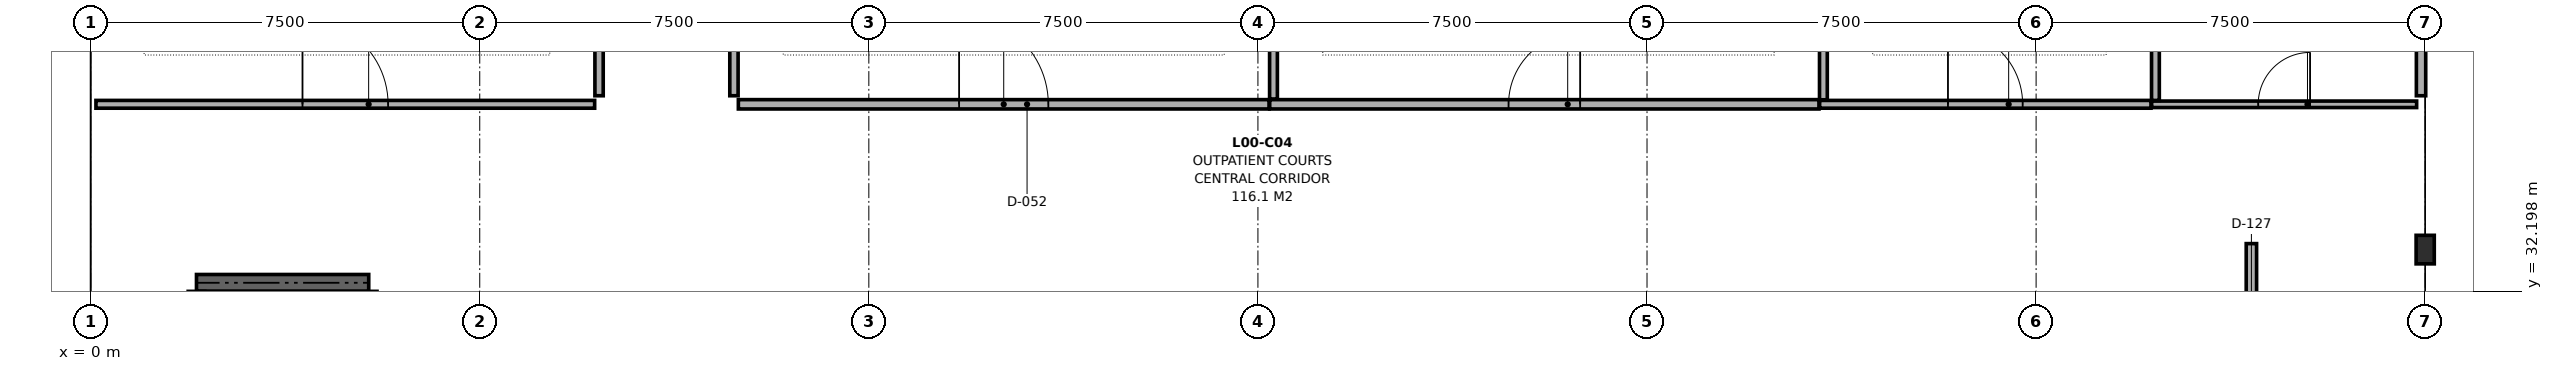
"""IFC4 building model, lengths in metres.
Left out: names, types, materials, properties, quantities, classifications, styles, units other than length and angle.
Written with IfcOpenShell. Run it as: python <this file> out.ifc"""

import sys

from ifc_helpers import new_model, si_unit, direction, frame, frame_2d, origin, origin_2d, place, context, subcontext, project, spatial, rectangle, extrude, element, fill, save


model = new_model("IFC4")
c1 = context("Model", 3, precision=1e-05, world=origin(), true_north=direction((0.0, 1.0)))
c2 = subcontext(c1, "Body", "Model", "MODEL_VIEW")
j1 = project(units=[si_unit("LENGTHUNIT", "METRE"), si_unit("PLANEANGLEUNIT", "RADIAN")], contexts=[c1])
p1 = place(None, origin())
s1 = spatial("IfcSite", under=j1, at=p1, CompositionType="ELEMENT")
p2 = place(p1, origin())
s2 = spatial("IfcBuilding", under=s1, at=p2, CompositionType="ELEMENT")
p3 = place(p2, origin())
s3 = spatial("IfcBuildingStorey", under=s2, at=p3, CompositionType="ELEMENT", Elevation=0.0)
p4 = place(p3, frame((45.0, 33.0, 0.0), z_axis=(0.0, 0.0, 1.0), x_axis=(1.0, 0.0, 0.0)))
e1 = element("IfcColumn", 1, at=p4, inside=s3, PredefinedType="PILASTER", context=c2, shape_type="SweptSolid", body=[
    extrude(rectangle(XDim=0.35, YDim=0.55, at=origin_2d()), origin(), (0.0, 0.0, 1.0), 4.7),
])
p5 = place(p3, frame((5.36, 32.36, 0.0), z_axis=(0.0, 0.0, 1.0), x_axis=(-1.0, 0.0, 0.0)))
e2 = element("IfcWall", 2, at=p5, inside=s3, PredefinedType="SHEAR", context=c2, shape_type="SweptSolid", body=[
    extrude(rectangle(XDim=3.32, YDim=0.32, at=frame_2d((1.66, 0.0))), origin(), (0.0, 0.0, 1.0), 4.7),
])
p6 = place(p3, frame((0.102, 35.8, 0.0), z_axis=(0.0, 0.0, 1.0), x_axis=(1.0, 0.0, 0.0)))
e3 = element("IfcWall", 3, at=p6, inside=s3, PredefinedType="PARTITIONING", context=c2, shape_type="SweptSolid", body=[
    extrude(rectangle(XDim=9.613, YDim=0.15, at=frame_2d((4.807, 0.0))), origin(), (0.0, 0.0, 1.0), 3.765),
])
p7 = place(p6, frame((3.981, 0.0, 0.0)))
e4 = element("IfcOpeningElement", 4, at=p7, cuts=e3, PredefinedType="OPENING", context=c2, shape_type="SweptSolid", body=[
    extrude(rectangle(XDim=1.65, YDim=2.32, at=frame_2d((0.825, 1.16))), frame((0.0, 0.087, 0.0), z_axis=(0.0, -1.0, 0.0), x_axis=(1.0, 0.0, 0.0)), (0.0, 0.0, 1.0), 0.174),
])
p8 = place(p3, frame((12.485, 35.8, 0.0), z_axis=(0.0, 0.0, 1.0), x_axis=(1.0, 0.0, 0.0)))
e5 = element("IfcWall", 5, at=p8, inside=s3, PredefinedType="PARTITIONING", context=c2, shape_type="SweptSolid", body=[
    extrude(rectangle(XDim=10.23, YDim=0.18, at=frame_2d((5.115, 0.0))), origin(), (0.0, 0.0, 1.0), 3.765),
])
p9 = place(p8, frame((4.255, 0.0, 0.0)))
e6 = element("IfcOpeningElement", 6, at=p9, cuts=e5, PredefinedType="OPENING", context=c2, shape_type="SweptSolid", body=[
    extrude(rectangle(XDim=1.72, YDim=2.34, at=frame_2d((0.86, 1.17))), frame((0.0, 0.102, 0.0), z_axis=(0.0, -1.0, 0.0), x_axis=(1.0, 0.0, 0.0)), (0.0, 0.0, 1.0), 0.204),
])
p10 = place(p3, frame((22.727, 35.8, 0.0), z_axis=(0.0, 0.0, 1.0), x_axis=(1.0, 0.0, 0.0)))
e7 = element("IfcWall", 7, at=p10, inside=s3, PredefinedType="PARTITIONING", context=c2, shape_type="SweptSolid", body=[
    extrude(rectangle(XDim=10.588, YDim=0.18, at=frame_2d((5.294, 0.0))), origin(), (0.0, 0.0, 1.0), 3.765),
])
p11 = place(p10, frame((4.604, 0.0, 0.0)))
e8 = element("IfcOpeningElement", 8, at=p11, cuts=e7, PredefinedType="OPENING", context=c2, shape_type="SweptSolid", body=[
    extrude(rectangle(XDim=1.38, YDim=2.3, at=frame_2d((0.69, 1.15))), frame((0.0, 0.102, 0.0), z_axis=(0.0, -1.0, 0.0), x_axis=(1.0, 0.0, 0.0)), (0.0, 0.0, 1.0), 0.204),
])
p12 = place(p3, frame((33.327, 35.8, 0.0), z_axis=(0.0, 0.0, 1.0), x_axis=(1.0, 0.0, 0.0)))
e9 = element("IfcWall", 9, at=p12, inside=s3, PredefinedType="PARTITIONING", context=c2, shape_type="SweptSolid", body=[
    extrude(rectangle(XDim=6.388, YDim=0.15, at=frame_2d((3.194, 0.0))), origin(), (0.0, 0.0, 1.0), 3.985),
])
p13 = place(p12, frame((2.474, 0.0, 0.0)))
e10 = element("IfcOpeningElement", 10, at=p13, cuts=e9, PredefinedType="OPENING", context=c2, shape_type="SweptSolid", body=[
    extrude(rectangle(XDim=1.44, YDim=2.32, at=frame_2d((0.72, 1.16))), frame((0.0, 0.087, 0.0), z_axis=(0.0, -1.0, 0.0), x_axis=(1.0, 0.0, 0.0)), (0.0, 0.0, 1.0), 0.174),
])
p14 = place(p3, frame((39.727, 35.8, 0.0), z_axis=(0.0, 0.0, 1.0), x_axis=(1.0, 0.0, 0.0)))
e11 = element("IfcWall", 11, at=p14, inside=s3, PredefinedType="PARTITIONING", context=c2, shape_type="SweptSolid", body=[
    extrude(rectangle(XDim=5.108, YDim=0.125, at=frame_2d((2.554, 0.0))), origin(), (0.0, 0.0, 1.0), 4.035),
])
p15 = place(p14, frame((2.054, 0.0, 0.0)))
e12 = element("IfcOpeningElement", 12, at=p15, cuts=e11, PredefinedType="OPENING", context=c2, shape_type="SweptSolid", body=[
    extrude(rectangle(XDim=1.0, YDim=2.15, at=frame_2d((0.5, 1.075))), frame((0.0, 0.074, 0.0), z_axis=(0.0, -1.0, 0.0), x_axis=(1.0, 0.0, 0.0)), (0.0, 0.0, 1.0), 0.149),
])
p16 = place(p3, frame((41.65, 27.735, 0.0), z_axis=(0.0, 0.0, 1.0), x_axis=(0.0, 1.0, 0.0)))
e13 = element("IfcWall", 13, at=p16, inside=s3, PredefinedType="PARTITIONING", context=c2, shape_type="SweptSolid", body=[
    extrude(rectangle(XDim=5.38, YDim=0.2, at=frame_2d((2.69, 0.0))), origin(), (0.0, 0.0, 1.0), 3.985),
])
p17 = place(p16, frame((1.79, 0.0, 0.0)))
e14 = element("IfcOpeningElement", 14, at=p17, cuts=e13, PredefinedType="OPENING", context=c2, shape_type="SweptSolid", body=[
    extrude(rectangle(XDim=1.8, YDim=2.15, at=frame_2d((0.9, 1.075))), frame((0.0, 0.112, 0.0), z_axis=(0.0, -1.0, 0.0), x_axis=(1.0, 0.0, 0.0)), (0.0, 0.0, 1.0), 0.224),
])
p18 = place(p3, frame((9.8, 35.965, 0.0), z_axis=(0.0, 0.0, 1.0), x_axis=(0.0, 1.0, 0.0)))
e15 = element("IfcWall", 15, at=p18, inside=s3, PredefinedType="PARTITIONING", context=c2, shape_type="SweptSolid", body=[
    extrude(rectangle(XDim=9.908, YDim=0.16, at=frame_2d((4.954, 0.0))), origin(), (0.0, 0.0, 1.0), 3.765),
])
p19 = place(p3, frame((12.4, 35.965, 0.0), z_axis=(0.0, 0.0, 1.0), x_axis=(0.0, 1.0, 0.0)))
e16 = element("IfcWall", 16, at=p19, inside=s3, PredefinedType="PARTITIONING", context=c2, shape_type="SweptSolid", body=[
    extrude(rectangle(XDim=9.59, YDim=0.16, at=frame_2d((4.795, 0.0))), origin(), (0.0, 0.0, 1.0), 3.765),
])
p20 = place(p3, frame((22.8, 35.902, 0.0), z_axis=(0.0, 0.0, 1.0), x_axis=(0.0, 1.0, 0.0)))
e17 = element("IfcWall", 17, at=p20, inside=s3, PredefinedType="PARTITIONING", context=c2, shape_type="SweptSolid", body=[
    extrude(rectangle(XDim=9.536, YDim=0.15, at=frame_2d((4.768, 0.0))), origin(), (0.0, 0.0, 1.0), 3.765),
])
p21 = place(p3, frame((33.4, 35.887, 0.0), z_axis=(0.0, 0.0, 1.0), x_axis=(0.0, 1.0, 0.0)))
e18 = element("IfcWall", 18, at=p21, inside=s3, PredefinedType="PARTITIONING", context=c2, shape_type="SweptSolid", body=[
    extrude(rectangle(XDim=9.731, YDim=0.15, at=frame_2d((4.865, 0.0))), origin(), (0.0, 0.0, 1.0), 3.985),
])
p22 = place(p3, frame((39.8, 35.875, 0.0), z_axis=(0.0, 0.0, 1.0), x_axis=(0.0, 1.0, 0.0)))
e19 = element("IfcWall", 19, at=p22, inside=s3, PredefinedType="PARTITIONING", context=c2, shape_type="SweptSolid", body=[
    extrude(rectangle(XDim=9.753, YDim=0.15, at=frame_2d((4.877, 0.0))), origin(), (0.0, 0.0, 1.0), 3.985),
])
p23 = place(p3, frame((44.92, 35.965, 0.0), z_axis=(0.0, 0.0, 1.0), x_axis=(0.0, 1.0, 0.0)))
e20 = element("IfcWall", 20, at=p23, inside=s3, PredefinedType="PARTITIONING", context=c2, shape_type="SweptSolid", body=[
    extrude(rectangle(XDim=9.498, YDim=0.18, at=frame_2d((4.749, 0.0))), origin(), (0.0, 0.0, 1.0), 3.985),
])
p24 = place(p7, origin())
e21 = element("IfcDoor", 21, at=p24, inside=s3, OperationType="SINGLE_SWING_LEFT", PredefinedType="DOOR", context=c2, shape_type="SweptSolid", body=[
    extrude(rectangle(XDim=1.65, YDim=2.32, at=frame_2d((0.825, 1.16))), frame((0.0, 0.025, 0.0), z_axis=(0.0, -1.0, 0.0), x_axis=(1.0, 0.0, 0.0)), (0.0, 0.0, 1.0), 0.05),
])
fill(e4, e21)
p25 = place(p9, origin())
e22 = element("IfcDoor", 22, at=p25, inside=s3, OperationType="SINGLE_SWING_LEFT", PredefinedType="DOOR", context=c2, shape_type="SweptSolid", body=[
    extrude(rectangle(XDim=1.72, YDim=2.34, at=frame_2d((0.86, 1.17))), frame((0.0, 0.025, 0.0), z_axis=(0.0, -1.0, 0.0), x_axis=(1.0, 0.0, 0.0)), (0.0, 0.0, 1.0), 0.05),
])
fill(e6, e22)
p26 = place(p11, origin())
e23 = element("IfcDoor", 23, at=p26, inside=s3, OperationType="SINGLE_SWING_RIGHT", PredefinedType="DOOR", context=c2, shape_type="SweptSolid", body=[
    extrude(rectangle(XDim=1.38, YDim=2.3, at=frame_2d((0.69, 1.15))), frame((0.0, 0.025, 0.0), z_axis=(0.0, -1.0, 0.0), x_axis=(1.0, 0.0, 0.0)), (0.0, 0.0, 1.0), 0.05),
])
fill(e8, e23)
p27 = place(p13, origin())
e24 = element("IfcDoor", 24, at=p27, inside=s3, OperationType="SINGLE_SWING_LEFT", PredefinedType="DOOR", context=c2, shape_type="SweptSolid", body=[
    extrude(rectangle(XDim=1.44, YDim=2.32, at=frame_2d((0.72, 1.16))), frame((0.0, 0.025, 0.0), z_axis=(0.0, -1.0, 0.0), x_axis=(1.0, 0.0, 0.0)), (0.0, 0.0, 1.0), 0.05),
])
fill(e10, e24)
p28 = place(p15, origin())
e25 = element("IfcDoor", 25, at=p28, inside=s3, OperationType="SINGLE_SWING_RIGHT", PredefinedType="DOOR", context=c2, shape_type="SweptSolid", body=[
    extrude(rectangle(XDim=1.0, YDim=2.15, at=frame_2d((0.5, 1.075))), frame((0.0, 0.025, 0.0), z_axis=(0.0, -1.0, 0.0), x_axis=(1.0, 0.0, 0.0)), (0.0, 0.0, 1.0), 0.05),
])
fill(e12, e25)
save(model, sys.argv[1])
